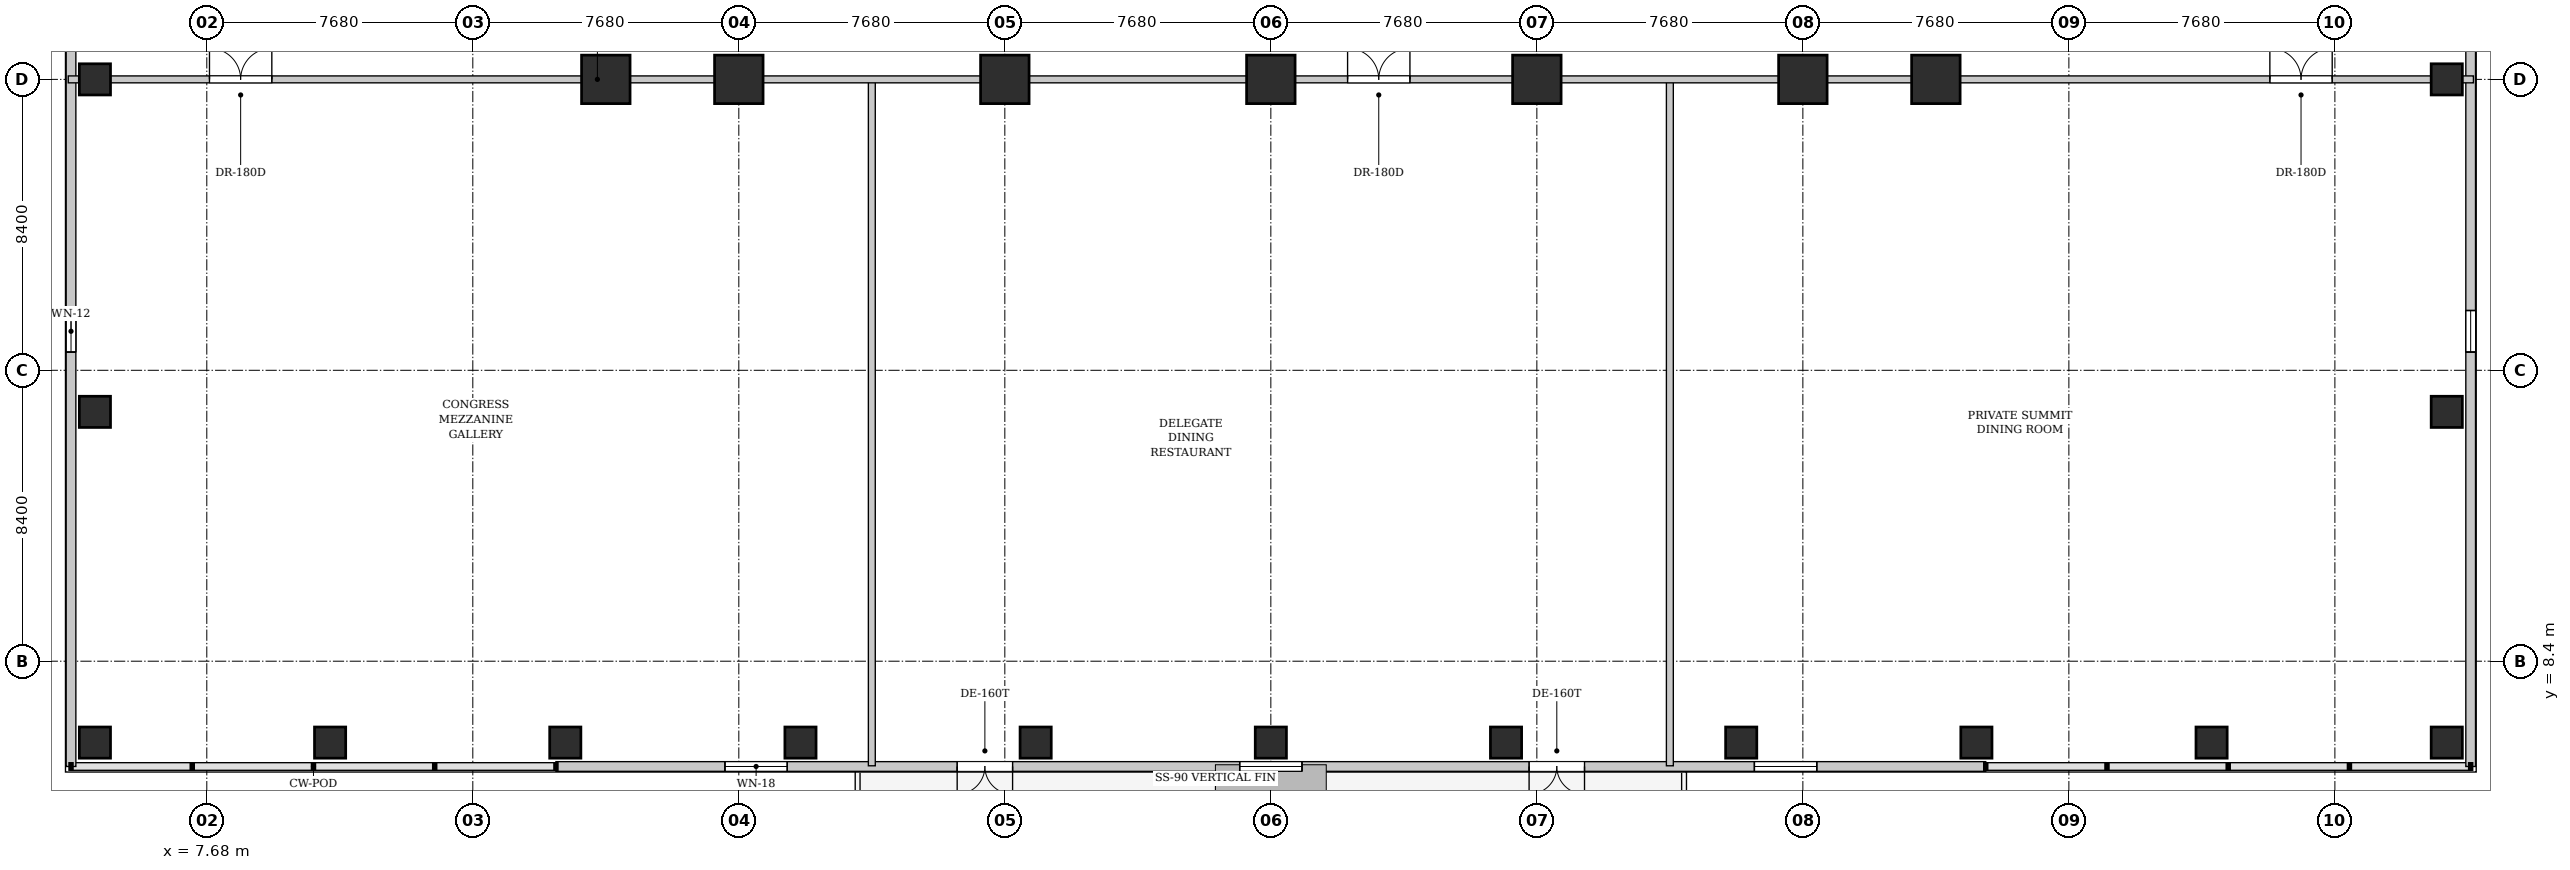
"""IFC4 building model, lengths in metres.
Left out: names, types, materials, properties, quantities, classifications, styles, units other than length and angle.
Written with IfcOpenShell. Run it as: python <this file> out.ifc"""

import sys

from ifc_helpers import new_model, si_unit, direction, frame, frame_2d, origin, origin_2d, place, context, subcontext, project, spatial, rectangle, extrude, element, fill, save


model = new_model("IFC4")
c1 = context("Model", 3, precision=1e-05, world=origin(), true_north=direction((0.0, 1.0)))
c2 = subcontext(c1, "Body", "Model", "MODEL_VIEW")
j1 = project(units=[si_unit("LENGTHUNIT", "METRE"), si_unit("PLANEANGLEUNIT", "RADIAN")], contexts=[c1])
p1 = place(None, origin())
s1 = spatial("IfcSite", under=j1, at=p1, CompositionType="ELEMENT")
p2 = place(p1, origin())
s2 = spatial("IfcBuilding", under=s1, at=p2, CompositionType="ELEMENT")
p3 = place(p2, frame((0.0, 0.0, 25.2)))
s3 = spatial("IfcBuildingStorey", under=s2, at=p3, CompositionType="ELEMENT", Elevation=25.2)
for number, where, z_axis, x_axis in (
    (1, (23.04, 25.2, 0.0), (0.0, 0.0, 1.0), (1.0, 0.0, 0.0)),
    (2, (30.72, 25.2, 0.0), (0.0, 0.0, 1.0), (1.0, 0.0, 0.0)),
    (3, (38.4, 25.2, 0.0), (0.0, 0.0, 1.0), (1.0, 0.0, 0.0)),
    (4, (46.08, 25.2, 0.0), (0.0, 0.0, 1.0), (1.0, 0.0, 0.0)),
    (5, (53.76, 25.2, 0.0), (0.0, 0.0, 1.0), (1.0, 0.0, 0.0)),
    (6, (19.2, 25.2, 0.0), (0.0, 0.0, 1.0), (1.0, 0.0, 0.0)),
    (7, (57.6, 25.2, 0.0), (0.0, 0.0, 1.0), (1.0, 0.0, 0.0)),
):
    element("IfcColumn", number, at=place(p3, frame(where, z_axis=z_axis, x_axis=x_axis)), inside=s3, PredefinedType="COLUMN", context=c2, shape_type="SweptSolid", body=[
        extrude(rectangle(XDim=1.4, YDim=1.4, at=origin_2d()), origin(), (0.0, 0.0, 1.0), 5.2),
    ])
for number, where, z_axis, x_axis in (
    (8, (4.45, 6.05, 0.0), (0.0, 0.0, 1.0), (1.0, 0.0, 0.0)),
    (9, (11.24, 6.05, 0.0), (0.0, 0.0, 1.0), (1.0, 0.0, 0.0)),
    (10, (18.03, 6.05, 0.0), (0.0, 0.0, 1.0), (1.0, 0.0, 0.0)),
    (11, (24.82, 6.05, 0.0), (0.0, 0.0, 1.0), (1.0, 0.0, 0.0)),
    (12, (31.61, 6.05, 0.0), (0.0, 0.0, 1.0), (1.0, 0.0, 0.0)),
    (13, (38.4, 6.05, 0.0), (0.0, 0.0, 1.0), (1.0, 0.0, 0.0)),
    (14, (45.19, 6.05, 0.0), (0.0, 0.0, 1.0), (1.0, 0.0, 0.0)),
    (15, (51.98, 6.05, 0.0), (0.0, 0.0, 1.0), (1.0, 0.0, 0.0)),
    (16, (58.77, 6.05, 0.0), (0.0, 0.0, 1.0), (1.0, 0.0, 0.0)),
    (17, (65.56, 6.05, 0.0), (0.0, 0.0, 1.0), (1.0, 0.0, 0.0)),
    (18, (72.35, 6.05, 0.0), (0.0, 0.0, 1.0), (1.0, 0.0, 0.0)),
    (19, (4.45, 15.6, 0.0), (0.0, 0.0, 1.0), (1.0, 0.0, 0.0)),
    (20, (72.35, 15.6, 0.0), (0.0, 0.0, 1.0), (1.0, 0.0, 0.0)),
    (21, (4.45, 25.2, 0.0), (0.0, 0.0, 1.0), (1.0, 0.0, 0.0)),
    (22, (72.35, 25.2, 0.0), (0.0, 0.0, 1.0), (1.0, 0.0, 0.0)),
):
    element("IfcColumn", number, at=place(p3, frame(where, z_axis=z_axis, x_axis=x_axis)), inside=s3, PredefinedType="COLUMN", context=c2, shape_type="SweptSolid", body=[
        extrude(rectangle(XDim=0.9, YDim=0.9, at=origin_2d()), origin(), (0.0, 0.0, 1.0), 5.2),
    ])
p4 = place(p3, frame((3.76, 5.36, 0.0), z_axis=(0.0, 0.0, 1.0), x_axis=(0.0, 1.0, 0.0)))
e23 = element("IfcWall", 23, at=p4, inside=s3, PredefinedType="SOLIDWALL", context=c2, shape_type="SweptSolid", body=[
    extrude(rectangle(XDim=44.88, YDim=0.28, at=frame_2d((22.44, 0.0))), origin(), (0.0, 0.0, 1.0), 4.78),
])
p5 = place(p4, frame((11.966, 0.0, 1.0)))
e24 = element("IfcOpeningElement", 24, at=p5, cuts=e23, PredefinedType="OPENING", context=c2, shape_type="SweptSolid", body=[
    extrude(rectangle(XDim=1.2, YDim=1.8, at=frame_2d((0.6, 0.9))), frame((0.0, 0.15, 0.0), z_axis=(0.0, -1.0, 0.0), x_axis=(1.0, 0.0, 0.0)), (0.0, 0.0, 1.0), 0.3),
])
p6 = place(p4, frame((31.714, 0.0, 1.0)))
e25 = element("IfcOpeningElement", 25, at=p6, cuts=e23, PredefinedType="OPENING", context=c2, shape_type="SweptSolid", body=[
    extrude(rectangle(XDim=1.2, YDim=1.8, at=frame_2d((0.6, 0.9))), frame((0.0, 0.15, 0.0), z_axis=(0.0, -1.0, 0.0), x_axis=(1.0, 0.0, 0.0)), (0.0, 0.0, 1.0), 0.3),
])
p7 = place(p3, frame((73.04, 50.24, 0.0), z_axis=(0.0, 0.0, 1.0), x_axis=(0.0, -1.0, 0.0)))
e26 = element("IfcWall", 26, at=p7, inside=s3, PredefinedType="SOLIDWALL", context=c2, shape_type="SweptSolid", body=[
    extrude(rectangle(XDim=44.88, YDim=0.28, at=frame_2d((22.44, 0.0))), origin(), (0.0, 0.0, 1.0), 4.78),
])
p8 = place(p7, frame((11.966, 0.0, 1.0)))
e27 = element("IfcOpeningElement", 27, at=p8, cuts=e26, PredefinedType="OPENING", context=c2, shape_type="SweptSolid", body=[
    extrude(rectangle(XDim=1.2, YDim=1.8, at=frame_2d((0.6, 0.9))), frame((0.0, 0.15, 0.0), z_axis=(0.0, -1.0, 0.0), x_axis=(1.0, 0.0, 0.0)), (0.0, 0.0, 1.0), 0.3),
])
p9 = place(p7, frame((31.714, 0.0, 1.0)))
e28 = element("IfcOpeningElement", 28, at=p9, cuts=e26, PredefinedType="OPENING", context=c2, shape_type="SweptSolid", body=[
    extrude(rectangle(XDim=1.2, YDim=1.8, at=frame_2d((0.6, 0.9))), frame((0.0, 0.15, 0.0), z_axis=(0.0, -1.0, 0.0), x_axis=(1.0, 0.0, 0.0)), (0.0, 0.0, 1.0), 0.3),
])
p10 = place(p3, frame((17.76, 5.36, 0.0), z_axis=(0.0, 0.0, 1.0), x_axis=(1.0, 0.0, 0.0)))
e29 = element("IfcWall", 29, at=p10, inside=s3, PredefinedType="SOLIDWALL", context=c2, shape_type="SweptSolid", body=[
    extrude(rectangle(XDim=41.28, YDim=0.28, at=frame_2d((20.64, 0.0))), origin(), (0.0, 0.0, 1.0), 4.78),
])
p11 = place(p10, frame((11.584, 0.0, 0.0)))
e30 = element("IfcOpeningElement", 30, at=p11, cuts=e29, PredefinedType="OPENING", context=c2, shape_type="SweptSolid", body=[
    extrude(rectangle(XDim=1.6, YDim=2.25, at=frame_2d((0.8, 1.125))), frame((0.0, 0.15, 0.0), z_axis=(0.0, -1.0, 0.0), x_axis=(1.0, 0.0, 0.0)), (0.0, 0.0, 1.0), 0.3),
])
p12 = place(p10, frame((28.096, 0.0, 0.0)))
e31 = element("IfcOpeningElement", 31, at=p12, cuts=e29, PredefinedType="OPENING", context=c2, shape_type="SweptSolid", body=[
    extrude(rectangle(XDim=1.6, YDim=2.25, at=frame_2d((0.8, 1.125))), frame((0.0, 0.15, 0.0), z_axis=(0.0, -1.0, 0.0), x_axis=(1.0, 0.0, 0.0)), (0.0, 0.0, 1.0), 0.3),
])
p13 = place(p10, frame((4.879, 0.0, 0.9)))
e32 = element("IfcOpeningElement", 32, at=p13, cuts=e29, PredefinedType="OPENING", context=c2, shape_type="SweptSolid", body=[
    extrude(rectangle(XDim=1.8, YDim=2.0, at=frame_2d((0.9, 1.0))), frame((0.0, 0.15, 0.0), z_axis=(0.0, -1.0, 0.0), x_axis=(1.0, 0.0, 0.0)), (0.0, 0.0, 1.0), 0.3),
])
p14 = place(p10, frame((19.74, 0.0, 0.9)))
e33 = element("IfcOpeningElement", 33, at=p14, cuts=e29, PredefinedType="OPENING", context=c2, shape_type="SweptSolid", body=[
    extrude(rectangle(XDim=1.8, YDim=2.0, at=frame_2d((0.9, 1.0))), frame((0.0, 0.15, 0.0), z_axis=(0.0, -1.0, 0.0), x_axis=(1.0, 0.0, 0.0)), (0.0, 0.0, 1.0), 0.3),
])
p15 = place(p10, frame((34.601, 0.0, 0.9)))
e34 = element("IfcOpeningElement", 34, at=p15, cuts=e29, PredefinedType="OPENING", context=c2, shape_type="SweptSolid", body=[
    extrude(rectangle(XDim=1.8, YDim=2.0, at=frame_2d((0.9, 1.0))), frame((0.0, 0.15, 0.0), z_axis=(0.0, -1.0, 0.0), x_axis=(1.0, 0.0, 0.0)), (0.0, 0.0, 1.0), 0.3),
])
for number, where, z_axis, x_axis in (
    (35, (26.88, 5.38, 0.0), (0.0, 0.0, 1.0), (0.0, 1.0, 0.0)),
    (36, (49.92, 5.38, 0.0), (0.0, 0.0, 1.0), (0.0, 1.0, 0.0)),
):
    element("IfcWall", number, at=place(p3, frame(where, z_axis=z_axis, x_axis=x_axis)), inside=s3, PredefinedType="PARTITIONING", context=c2, shape_type="SweptSolid", body=[
        extrude(rectangle(XDim=19.82, YDim=0.2, at=frame_2d((9.91, 0.0))), origin(), (0.0, 0.0, 1.0), 4.78),
    ])
p16 = place(p3, frame((3.68, 25.2, 0.0), z_axis=(0.0, 0.0, 1.0), x_axis=(1.0, 0.0, 0.0)))
e37 = element("IfcWall", 37, at=p16, inside=s3, PredefinedType="PARTITIONING", context=c2, shape_type="SweptSolid", body=[
    extrude(rectangle(XDim=69.44, YDim=0.2, at=frame_2d((34.72, 0.0))), origin(), (0.0, 0.0, 1.0), 3.767),
])
p17 = place(p16, frame((4.077, 0.0, 0.0)))
e38 = element("IfcOpeningElement", 38, at=p17, cuts=e37, PredefinedType="OPENING", context=c2, shape_type="SweptSolid", body=[
    extrude(rectangle(XDim=1.8, YDim=2.3, at=frame_2d((0.9, 1.15))), frame((0.0, 0.11, 0.0), z_axis=(0.0, -1.0, 0.0), x_axis=(1.0, 0.0, 0.0)), (0.0, 0.0, 1.0), 0.22),
])
p18 = place(p16, frame((36.936, 0.0, 0.0)))
e39 = element("IfcOpeningElement", 39, at=p18, cuts=e37, PredefinedType="OPENING", context=c2, shape_type="SweptSolid", body=[
    extrude(rectangle(XDim=1.8, YDim=2.3, at=frame_2d((0.9, 1.15))), frame((0.0, 0.11, 0.0), z_axis=(0.0, -1.0, 0.0), x_axis=(1.0, 0.0, 0.0)), (0.0, 0.0, 1.0), 0.22),
])
p19 = place(p16, frame((63.562, 0.0, 0.0)))
e40 = element("IfcOpeningElement", 40, at=p19, cuts=e37, PredefinedType="OPENING", context=c2, shape_type="SweptSolid", body=[
    extrude(rectangle(XDim=1.8, YDim=2.3, at=frame_2d((0.9, 1.15))), frame((0.0, 0.11, 0.0), z_axis=(0.0, -1.0, 0.0), x_axis=(1.0, 0.0, 0.0)), (0.0, 0.0, 1.0), 0.22),
])
p20 = place(p5, origin())
e41 = element("IfcWindow", 41, at=p20, inside=s3, PartitioningType="SINGLE_PANEL", PredefinedType="WINDOW", context=c2, shape_type="SweptSolid", body=[
    extrude(rectangle(XDim=1.2, YDim=1.8, at=frame_2d((0.6, 0.9))), frame((0.0, 0.03, 0.0), z_axis=(0.0, -1.0, 0.0), x_axis=(1.0, 0.0, 0.0)), (0.0, 0.0, 1.0), 0.06),
])
fill(e24, e41)
p21 = place(p9, origin())
e42 = element("IfcWindow", 42, at=p21, inside=s3, PartitioningType="SINGLE_PANEL", PredefinedType="WINDOW", context=c2, shape_type="SweptSolid", body=[
    extrude(rectangle(XDim=1.2, YDim=1.8, at=frame_2d((0.6, 0.9))), frame((0.0, 0.03, 0.0), z_axis=(0.0, -1.0, 0.0), x_axis=(1.0, 0.0, 0.0)), (0.0, 0.0, 1.0), 0.06),
])
fill(e28, e42)
p22 = place(p11, frame((1.6, 0.0, 0.0), z_axis=(0.0, 0.0, 1.0), x_axis=(-1.0, 0.0, 0.0)))
e43 = element("IfcDoor", 43, at=p22, inside=s3, OperationType="SINGLE_SWING_LEFT", PredefinedType="DOOR", context=c2, shape_type="SweptSolid", body=[
    extrude(rectangle(XDim=1.6, YDim=2.25, at=frame_2d((0.8, 1.125))), frame((0.0, 0.025, 0.0), z_axis=(0.0, -1.0, 0.0), x_axis=(1.0, 0.0, 0.0)), (0.0, 0.0, 1.0), 0.05),
])
fill(e30, e43)
p23 = place(p12, frame((1.6, 0.0, 0.0), z_axis=(0.0, 0.0, 1.0), x_axis=(-1.0, 0.0, 0.0)))
e44 = element("IfcDoor", 44, at=p23, inside=s3, OperationType="SINGLE_SWING_LEFT", PredefinedType="DOOR", context=c2, shape_type="SweptSolid", body=[
    extrude(rectangle(XDim=1.6, YDim=2.25, at=frame_2d((0.8, 1.125))), frame((0.0, 0.025, 0.0), z_axis=(0.0, -1.0, 0.0), x_axis=(1.0, 0.0, 0.0)), (0.0, 0.0, 1.0), 0.05),
])
fill(e31, e44)
p24 = place(p13, origin())
e45 = element("IfcWindow", 45, at=p24, inside=s3, PartitioningType="SINGLE_PANEL", PredefinedType="WINDOW", context=c2, shape_type="SweptSolid", body=[
    extrude(rectangle(XDim=1.8, YDim=2.0, at=frame_2d((0.9, 1.0))), frame((0.0, 0.03, 0.0), z_axis=(0.0, -1.0, 0.0), x_axis=(1.0, 0.0, 0.0)), (0.0, 0.0, 1.0), 0.06),
])
fill(e32, e45)
p25 = place(p14, origin())
e46 = element("IfcWindow", 46, at=p25, inside=s3, PartitioningType="SINGLE_PANEL", PredefinedType="WINDOW", context=c2, shape_type="SweptSolid", body=[
    extrude(rectangle(XDim=1.8, YDim=2.0, at=frame_2d((0.9, 1.0))), frame((0.0, 0.03, 0.0), z_axis=(0.0, -1.0, 0.0), x_axis=(1.0, 0.0, 0.0)), (0.0, 0.0, 1.0), 0.06),
])
fill(e33, e46)
p26 = place(p15, origin())
e47 = element("IfcWindow", 47, at=p26, inside=s3, PartitioningType="SINGLE_PANEL", PredefinedType="WINDOW", context=c2, shape_type="SweptSolid", body=[
    extrude(rectangle(XDim=1.8, YDim=2.0, at=frame_2d((0.9, 1.0))), frame((0.0, 0.03, 0.0), z_axis=(0.0, -1.0, 0.0), x_axis=(1.0, 0.0, 0.0)), (0.0, 0.0, 1.0), 0.06),
])
fill(e34, e47)
p27 = place(p17, origin())
e48 = element("IfcDoor", 48, at=p27, inside=s3, OperationType="DOUBLE_DOOR_SINGLE_SWING", PredefinedType="DOOR", context=c2, shape_type="SweptSolid", body=[
    extrude(rectangle(XDim=1.8, YDim=2.3, at=frame_2d((0.9, 1.15))), frame((0.0, 0.025, 0.0), z_axis=(0.0, -1.0, 0.0), x_axis=(1.0, 0.0, 0.0)), (0.0, 0.0, 1.0), 0.05),
])
fill(e38, e48)
p28 = place(p18, origin())
e49 = element("IfcDoor", 49, at=p28, inside=s3, OperationType="DOUBLE_DOOR_SINGLE_SWING", PredefinedType="DOOR", context=c2, shape_type="SweptSolid", body=[
    extrude(rectangle(XDim=1.8, YDim=2.3, at=frame_2d((0.9, 1.15))), frame((0.0, 0.025, 0.0), z_axis=(0.0, -1.0, 0.0), x_axis=(1.0, 0.0, 0.0)), (0.0, 0.0, 1.0), 0.05),
])
fill(e39, e49)
p29 = place(p19, origin())
e50 = element("IfcDoor", 50, at=p29, inside=s3, OperationType="DOUBLE_DOOR_SINGLE_SWING", PredefinedType="DOOR", context=c2, shape_type="SweptSolid", body=[
    extrude(rectangle(XDim=1.8, YDim=2.3, at=frame_2d((0.9, 1.15))), frame((0.0, 0.025, 0.0), z_axis=(0.0, -1.0, 0.0), x_axis=(1.0, 0.0, 0.0)), (0.0, 0.0, 1.0), 0.05),
])
fill(e40, e50)
save(model, sys.argv[1])
